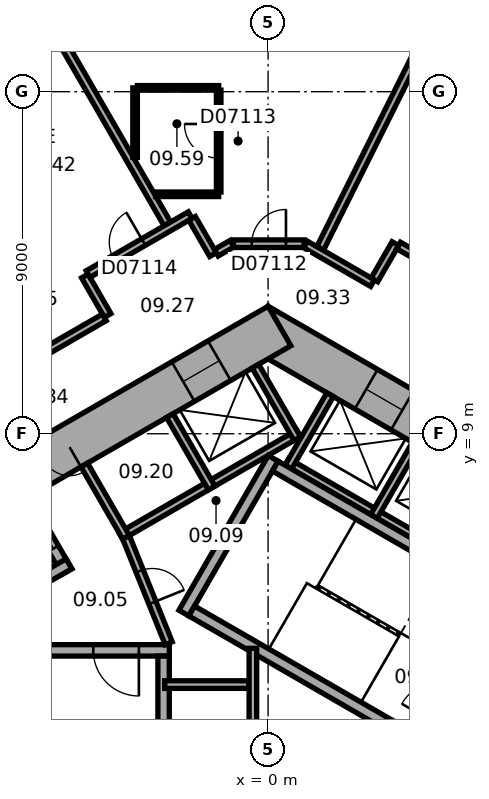
"""IFC4 building model, lengths in metres.
Left out: names, types, materials, properties, quantities, classifications, styles, units other than length and angle.
Written with IfcOpenShell. Run it as: python <this file> out.ifc"""

import sys

from ifc_helpers import new_model, si_unit, direction, frame, frame_2d, origin, place, context, subcontext, project, spatial, rectangle, extrude, element, fill, save


model = new_model("IFC4")
c1 = context("Model", 3, precision=1e-05, world=origin(), true_north=direction((0.0, 1.0)))
c2 = subcontext(c1, "Body", "Model", "MODEL_VIEW")
j1 = project(units=[si_unit("LENGTHUNIT", "METRE"), si_unit("PLANEANGLEUNIT", "RADIAN")], contexts=[c1])
p1 = place(None, origin())
s1 = spatial("IfcSite", under=j1, at=p1, CompositionType="ELEMENT")
p2 = place(p1, origin())
s2 = spatial("IfcBuilding", under=s1, at=p2, CompositionType="ELEMENT")
p3 = place(p2, frame((0.0, 0.0, 50.6)))
s3 = spatial("IfcBuildingStorey", under=s2, at=p3, CompositionType="ELEMENT", Elevation=50.6)
p4 = place(p3, frame((10.4, 5.658, 0.0), z_axis=(0.0, 0.0, 1.0), x_axis=(-0.866021384402, 0.500006961711, 0.0)))
e1 = element("IfcWall", 1, at=p4, inside=s3, PredefinedType="SHEAR", context=c2, shape_type="SweptSolid", body=[
    extrude(rectangle(XDim=12.355, YDim=1.2, at=frame_2d((6.178, 0.0))), origin(), (0.0, 0.0, 1.0), 3.3),
])
p5 = place(p4, frame((2.728, 0.0, 0.0)))
e2 = element("IfcOpeningElement", 2, at=p5, cuts=e1, PredefinedType="OPENING", context=c2, shape_type="SweptSolid", body=[
    extrude(rectangle(XDim=1.1, YDim=2.1, at=frame_2d((0.55, 1.05))), frame((0.0, 0.61, 0.0), z_axis=(0.0, -1.0, 0.0), x_axis=(1.0, 0.0, 0.0)), (0.0, 0.0, 1.0), 1.22),
])
p6 = place(p4, frame((5.328, 0.0, 0.0)))
e3 = element("IfcOpeningElement", 3, at=p6, cuts=e1, PredefinedType="OPENING", context=c2, shape_type="SweptSolid", body=[
    extrude(rectangle(XDim=1.1, YDim=2.1, at=frame_2d((0.55, 1.05))), frame((0.0, 0.61, 0.0), z_axis=(0.0, -1.0, 0.0), x_axis=(1.0, 0.0, 0.0)), (0.0, 0.0, 1.0), 1.22),
])
p7 = place(p4, frame((7.928, 0.0, 0.0)))
e4 = element("IfcOpeningElement", 4, at=p7, cuts=e1, PredefinedType="OPENING", context=c2, shape_type="SweptSolid", body=[
    extrude(rectangle(XDim=1.1, YDim=2.1, at=frame_2d((0.55, 1.05))), frame((0.0, 0.61, 0.0), z_axis=(0.0, -1.0, 0.0), x_axis=(1.0, 0.0, 0.0)), (0.0, 0.0, 1.0), 1.22),
])
p8 = place(p3, frame((0.3, 11.836, 0.0), z_axis=(0.0, 0.0, 1.0), x_axis=(-0.866021384402, -0.500006961711, 0.0)))
e5 = element("IfcWall", 5, at=p8, inside=s3, PredefinedType="SHEAR", context=c2, shape_type="SweptSolid", body=[
    extrude(rectangle(XDim=12.355, YDim=1.2, at=frame_2d((6.178, 0.0))), origin(), (0.0, 0.0, 1.0), 3.3),
])
p9 = place(p8, frame((6.378, 0.0, 0.0)))
e6 = element("IfcOpeningElement", 6, at=p9, cuts=e5, PredefinedType="OPENING", context=c2, shape_type="SweptSolid", body=[
    extrude(rectangle(XDim=1.5, YDim=2.1, at=frame_2d((0.75, 1.05))), frame((0.0, 0.61, 0.0), z_axis=(0.0, -1.0, 0.0), x_axis=(1.0, 0.0, 0.0)), (0.0, 0.0, 1.0), 1.22),
])
p10 = place(p8, frame((1.828, 0.0, 0.0)))
e7 = element("IfcOpeningElement", 7, at=p10, cuts=e5, PredefinedType="OPENING", context=c2, shape_type="SweptSolid", body=[
    extrude(rectangle(XDim=1.1, YDim=2.1, at=frame_2d((0.55, 1.05))), frame((0.0, 0.61, 0.0), z_axis=(0.0, -1.0, 0.0), x_axis=(1.0, 0.0, 0.0)), (0.0, 0.0, 1.0), 1.22),
])
p11 = place(p3, frame((20.63, 15.47, 0.0), z_axis=(0.0, 0.0, 1.0), x_axis=(-0.894934518609, 0.446197498203, 0.0)))
e8 = element("IfcWall", 8, at=p11, inside=s3, PredefinedType="STANDARD", context=c2, shape_type="SweptSolid", body=[
    extrude(rectangle(XDim=21.246, YDim=0.2, at=frame_2d((10.623, 0.0))), origin(), (0.0, 0.0, 1.0), 3.3),
])
p12 = place(p11, frame((1.553, 0.0, 0.8)))
e9 = element("IfcOpeningElement", 9, at=p12, cuts=e8, PredefinedType="OPENING", context=c2, shape_type="SweptSolid", body=[
    extrude(rectangle(XDim=2.4, YDim=1.7, at=frame_2d((1.2, 0.85))), frame((0.0, 0.11, 0.0), z_axis=(0.0, -1.0, 0.0), x_axis=(1.0, 0.0, 0.0)), (0.0, 0.0, 1.0), 0.22),
])
p13 = place(p11, frame((5.488, 0.0, 0.8)))
e10 = element("IfcOpeningElement", 10, at=p13, cuts=e8, PredefinedType="OPENING", context=c2, shape_type="SweptSolid", body=[
    extrude(rectangle(XDim=2.4, YDim=1.7, at=frame_2d((1.2, 0.85))), frame((0.0, 0.11, 0.0), z_axis=(0.0, -1.0, 0.0), x_axis=(1.0, 0.0, 0.0)), (0.0, 0.0, 1.0), 0.22),
])
p14 = place(p11, frame((9.422, 0.0, 0.8)))
e11 = element("IfcOpeningElement", 11, at=p14, cuts=e8, PredefinedType="OPENING", context=c2, shape_type="SweptSolid", body=[
    extrude(rectangle(XDim=2.4, YDim=1.7, at=frame_2d((1.2, 0.85))), frame((0.0, 0.11, 0.0), z_axis=(0.0, -1.0, 0.0), x_axis=(1.0, 0.0, 0.0)), (0.0, 0.0, 1.0), 0.22),
])
p15 = place(p11, frame((13.357, 0.0, 0.8)))
e12 = element("IfcOpeningElement", 12, at=p15, cuts=e8, PredefinedType="OPENING", context=c2, shape_type="SweptSolid", body=[
    extrude(rectangle(XDim=2.4, YDim=1.7, at=frame_2d((1.2, 0.85))), frame((0.0, 0.11, 0.0), z_axis=(0.0, -1.0, 0.0), x_axis=(1.0, 0.0, 0.0)), (0.0, 0.0, 1.0), 0.22),
])
p16 = place(p11, frame((17.292, 0.0, 0.8)))
e13 = element("IfcOpeningElement", 13, at=p16, cuts=e8, PredefinedType="OPENING", context=c2, shape_type="SweptSolid", body=[
    extrude(rectangle(XDim=2.4, YDim=1.7, at=frame_2d((1.2, 0.85))), frame((0.0, 0.11, 0.0), z_axis=(0.0, -1.0, 0.0), x_axis=(1.0, 0.0, 0.0)), (0.0, 0.0, 1.0), 0.22),
])
p17 = place(p3, frame((-3.136, 24.805, 0.0), z_axis=(0.0, 0.0, 1.0), x_axis=(-0.866028291626, -0.499994998079, 0.0)))
e14 = element("IfcWall", 14, at=p17, inside=s3, PredefinedType="STANDARD", context=c2, shape_type="SweptSolid", body=[
    extrude(rectangle(XDim=21.246, YDim=0.2, at=frame_2d((10.623, 0.0))), origin(), (0.0, 0.0, 1.0), 3.3),
])
p18 = place(p17, frame((1.555, 0.0, 0.8)))
e15 = element("IfcOpeningElement", 15, at=p18, cuts=e14, PredefinedType="OPENING", context=c2, shape_type="SweptSolid", body=[
    extrude(rectangle(XDim=2.4, YDim=1.7, at=frame_2d((1.2, 0.85))), frame((0.0, 0.11, 0.0), z_axis=(0.0, -1.0, 0.0), x_axis=(1.0, 0.0, 0.0)), (0.0, 0.0, 1.0), 0.22),
])
p19 = place(p17, frame((5.489, 0.0, 0.8)))
e16 = element("IfcOpeningElement", 16, at=p19, cuts=e14, PredefinedType="OPENING", context=c2, shape_type="SweptSolid", body=[
    extrude(rectangle(XDim=2.4, YDim=1.7, at=frame_2d((1.2, 0.85))), frame((0.0, 0.11, 0.0), z_axis=(0.0, -1.0, 0.0), x_axis=(1.0, 0.0, 0.0)), (0.0, 0.0, 1.0), 0.22),
])
p20 = place(p17, frame((9.424, 0.0, 0.8)))
e17 = element("IfcOpeningElement", 17, at=p20, cuts=e14, PredefinedType="OPENING", context=c2, shape_type="SweptSolid", body=[
    extrude(rectangle(XDim=2.4, YDim=1.7, at=frame_2d((1.2, 0.85))), frame((0.0, 0.11, 0.0), z_axis=(0.0, -1.0, 0.0), x_axis=(1.0, 0.0, 0.0)), (0.0, 0.0, 1.0), 0.22),
])
p21 = place(p17, frame((13.358, 0.0, 0.8)))
e18 = element("IfcOpeningElement", 18, at=p21, cuts=e14, PredefinedType="OPENING", context=c2, shape_type="SweptSolid", body=[
    extrude(rectangle(XDim=2.4, YDim=1.7, at=frame_2d((1.2, 0.85))), frame((0.0, 0.11, 0.0), z_axis=(0.0, -1.0, 0.0), x_axis=(1.0, 0.0, 0.0)), (0.0, 0.0, 1.0), 0.22),
])
p22 = place(p17, frame((17.293, 0.0, 0.8)))
e19 = element("IfcOpeningElement", 19, at=p22, cuts=e14, PredefinedType="OPENING", context=c2, shape_type="SweptSolid", body=[
    extrude(rectangle(XDim=2.4, YDim=1.7, at=frame_2d((1.2, 0.85))), frame((0.0, 0.11, 0.0), z_axis=(0.0, -1.0, 0.0), x_axis=(1.0, 0.0, 0.0)), (0.0, 0.0, 1.0), 0.22),
])
p23 = place(p3, frame((7.424, 4.259, 0.0), z_axis=(0.0, 0.0, 1.0), x_axis=(-0.866026010844, 0.49999894854, 0.0)))
e20 = element("IfcWall", 20, at=p23, inside=s3, PredefinedType="PARTITIONING", context=c2, shape_type="SweptSolid", body=[
    extrude(rectangle(XDim=8.0, YDim=0.2, at=frame_2d((4.0, 0.0))), origin(), (0.0, 0.0, 1.0), 3.05),
])
for number, where, z_axis, x_axis in (
    (21, (2.784, 6.822, 0.0), (0.0, 0.0, 1.0), (0.5, 0.866, 0.0)),
    (22, (0.532, 8.122, 0.0), (0.0, 0.0, 1.0), (0.5, 0.866, 0.0)),
):
    element("IfcWall", number, at=place(p3, frame(where, z_axis=z_axis, x_axis=x_axis)), inside=s3, PredefinedType="PARTITIONING", context=c2, shape_type="SweptSolid", body=[
        extrude(rectangle(XDim=2.2, YDim=0.2, at=frame_2d((1.1, 0.0))), origin(), (0.0, 0.0, 1.0), 3.05),
    ])
p24 = place(p3, frame((0.803, 9.009, 0.0), z_axis=(0.0, 0.0, 1.0), x_axis=(-0.866028230842, -0.499995103361, 0.0)))
e23 = element("IfcWall", 23, at=p24, inside=s3, PredefinedType="PARTITIONING", context=c2, shape_type="SweptSolid", body=[
    extrude(rectangle(XDim=5.4, YDim=0.2, at=frame_2d((2.7, 0.0))), origin(), (0.0, 0.0, 1.0), 3.05),
])
p25 = place(p3, frame((0.767, 8.872, 0.0), z_axis=(0.0, 0.0, 1.0), x_axis=(-0.499994660107, 0.866028486751, 0.0)))
e24 = element("IfcWall", 24, at=p25, inside=s3, PredefinedType="PARTITIONING", context=c2, shape_type="SweptSolid", body=[
    extrude(rectangle(XDim=2.2, YDim=0.2, at=frame_2d((1.1, 0.0))), origin(), (0.0, 0.0, 1.0), 3.05),
])
for number, where, z_axis, x_axis in (
    (25, (-1.485, 7.572, 0.0), (0.0, 0.0, 1.0), (-0.5, 0.866, 0.0)),
    (26, (-3.737, 6.272, 0.0), (0.0, 0.0, 1.0), (-0.5, 0.866, 0.0)),
):
    element("IfcWall", number, at=place(p3, frame(where, z_axis=z_axis, x_axis=x_axis)), inside=s3, PredefinedType="PARTITIONING", context=c2, shape_type="SweptSolid", body=[
        extrude(rectangle(XDim=2.2, YDim=0.2, at=frame_2d((1.1, 0.0))), origin(), (0.0, 0.0, 1.0), 3.05),
    ])
p26 = place(p3, frame((-2.216, 4.282, 0.0), z_axis=(0.0, 0.0, 1.0), x_axis=(0.499977259774, 0.866038532462, 0.0)))
e27 = element("IfcWall", 27, at=p26, inside=s3, PredefinedType="SHEAR", context=c2, shape_type="SweptSolid", body=[
    extrude(rectangle(XDim=4.7, YDim=0.3, at=frame_2d((2.35, 0.0))), origin(), (0.0, 0.0, 1.0), 3.05),
])
for number, where, z_axis, x_axis in (
    (28, (4.103, 0.807, 0.0), (0.0, 0.0, 1.0), (-0.866, 0.5, 0.0)),
    (29, (6.303, 4.617, 0.0), (0.0, 0.0, 1.0), (-0.866, 0.5, 0.0)),
):
    element("IfcWall", number, at=place(p3, frame(where, z_axis=z_axis, x_axis=x_axis)), inside=s3, PredefinedType="SHEAR", context=c2, shape_type="SweptSolid", body=[
        extrude(rectangle(XDim=7.06, YDim=0.3, at=frame_2d((3.53, 0.0))), origin(), (0.0, 0.0, 1.0), 3.05),
    ])
p27 = place(p3, frame((-2.6, 3.3, 0.0), z_axis=(0.0, 0.0, 1.0), x_axis=(-1.0, 0.0, 0.0)))
e30 = element("IfcWall", 30, at=p27, inside=s3, PredefinedType="SHEAR", context=c2, shape_type="SweptSolid", body=[
    extrude(rectangle(XDim=4.7, YDim=0.3, at=frame_2d((2.35, 0.0))), origin(), (0.0, 0.0, 1.0), 3.05),
])
p28 = place(p27, frame((0.8, 0.0, 0.0)))
e31 = element("IfcOpeningElement", 31, at=p28, cuts=e30, PredefinedType="OPENING", context=c2, shape_type="SweptSolid", body=[
    extrude(rectangle(XDim=1.2, YDim=2.1, at=frame_2d((0.6, 1.05))), frame((0.0, 0.16, 0.0), z_axis=(0.0, -1.0, 0.0), x_axis=(1.0, 0.0, 0.0)), (0.0, 0.0, 1.0), 0.32),
])
p29 = place(p3, frame((-2.75, 3.15, 0.0), z_axis=(0.0, 0.0, 1.0), x_axis=(0.0, -1.0, 0.0)))
e32 = element("IfcWall", 32, at=p29, inside=s3, PredefinedType="SHEAR", context=c2, shape_type="SweptSolid", body=[
    extrude(rectangle(XDim=7.06, YDim=0.3, at=frame_2d((3.53, 0.0))), origin(), (0.0, 0.0, 1.0), 3.05),
])
p30 = place(p3, frame((-5.295, 5.372, 0.0), z_axis=(0.0, 0.0, 1.0), x_axis=(-0.500077893725, 0.86598042715, 0.0)))
e33 = element("IfcWall", 33, at=p30, inside=s3, PredefinedType="SHEAR", context=c2, shape_type="SweptSolid", body=[
    extrude(rectangle(XDim=2.2, YDim=0.3, at=frame_2d((1.1, 0.0))), origin(), (0.0, 0.0, 1.0), 3.05),
])
p31 = place(p30, frame((0.7, 0.0, 0.0)))
e34 = element("IfcOpeningElement", 34, at=p31, cuts=e33, PredefinedType="OPENING", context=c2, shape_type="SweptSolid", body=[
    extrude(rectangle(XDim=1.1, YDim=2.1, at=frame_2d((0.55, 1.05))), frame((0.0, 0.16, 0.0), z_axis=(0.0, -1.0, 0.0), x_axis=(1.0, 0.0, 0.0)), (0.0, 0.0, 1.0), 0.32),
])
p32 = place(p3, frame((-5.24, 5.577, 0.0), z_axis=(0.0, 0.0, 1.0), x_axis=(-0.866014461049, -0.500018952895, 0.0)))
e35 = element("IfcWall", 35, at=p32, inside=s3, PredefinedType="SHEAR", context=c2, shape_type="SweptSolid", body=[
    extrude(rectangle(XDim=3.35, YDim=0.3, at=frame_2d((1.675, 0.0))), origin(), (0.0, 0.0, 1.0), 3.05),
])
p33 = place(p3, frame((-2.615, 3.487, 0.0), z_axis=(0.0, 0.0, 1.0), x_axis=(-0.373576831041, 0.92759924068, 0.0)))
e36 = element("IfcWall", 36, at=p33, inside=s3, PredefinedType="PARTITIONING", context=c2, shape_type="SweptSolid", body=[
    extrude(rectangle(XDim=3.002, YDim=0.2, at=frame_2d((1.501, 0.0))), origin(), (0.0, 0.0, 1.0), 3.05),
])
p34 = place(p33, frame((1.15, 0.0, 0.0)))
e37 = element("IfcOpeningElement", 37, at=p34, cuts=e36, PredefinedType="OPENING", context=c2, shape_type="SweptSolid", body=[
    extrude(rectangle(XDim=0.9, YDim=2.1, at=frame_2d((0.45, 1.05))), frame((0.0, 0.11, 0.0), z_axis=(0.0, -1.0, 0.0), x_axis=(1.0, 0.0, 0.0)), (0.0, 0.0, 1.0), 0.22),
])
p35 = place(p3, frame((-2.72, 2.4, 0.0), z_axis=(0.0, 0.0, 1.0), x_axis=(1.0, 0.0, 0.0)))
e38 = element("IfcWall", 38, at=p35, inside=s3, PredefinedType="PARTITIONING", context=c2, shape_type="SweptSolid", body=[
    extrude(rectangle(XDim=2.22, YDim=0.2, at=frame_2d((1.11, 0.0))), origin(), (0.0, 0.0, 1.0), 3.05),
])
p36 = place(p3, frame((-0.4, -3.353, 0.0), z_axis=(0.0, 0.0, 1.0), x_axis=(0.0, 1.0, 0.0)))
e39 = element("IfcWall", 39, at=p36, inside=s3, PredefinedType="PARTITIONING", context=c2, shape_type="SweptSolid", body=[
    extrude(rectangle(XDim=6.707, YDim=0.2, at=frame_2d((3.353, 0.0))), origin(), (0.0, 0.0, 1.0), 3.05),
])
p37 = place(p3, frame((-6.676, 21.492, 0.0), z_axis=(0.0, 0.0, 1.0), x_axis=(0.500011263043, -0.866018900966, 0.0)))
e40 = element("IfcWall", 40, at=p37, inside=s3, PredefinedType="PARTITIONING", context=c2, shape_type="SweptSolid", body=[
    extrude(rectangle(XDim=8.049, YDim=0.2, at=frame_2d((4.024, 0.0))), origin(), (0.0, 0.0, 1.0), 3.05),
])
p38 = place(p3, frame((-4.823, 13.152, 0.0), z_axis=(0.0, 0.0, 1.0), x_axis=(0.499986357472, -0.866033280158, 0.0)))
e41 = element("IfcWall", 41, at=p38, inside=s3, PredefinedType="PARTITIONING", context=c2, shape_type="SweptSolid", body=[
    extrude(rectangle(XDim=1.201, YDim=0.2, at=frame_2d((0.601, 0.0))), origin(), (0.0, 0.0, 1.0), 3.05),
])
p39 = place(p3, frame((-4.309, 12.061, 0.0), z_axis=(0.0, 0.0, 1.0), x_axis=(-0.866020679205, -0.500008183122, 0.0)))
e42 = element("IfcWall", 42, at=p39, inside=s3, PredefinedType="PARTITIONING", context=c2, shape_type="SweptSolid", body=[
    extrude(rectangle(XDim=5.104, YDim=0.2, at=frame_2d((2.552, 0.0))), origin(), (0.0, 0.0, 1.0), 3.05),
])
p40 = place(p3, frame((-3.5, 16.271, 0.0), z_axis=(0.0, 0.0, 1.0), x_axis=(0.0, 1.0, 0.0)))
e43 = element("IfcWall", 43, at=p40, inside=s3, PredefinedType="PARTITIONING", context=c2, shape_type="SweptSolid", body=[
    extrude(rectangle(XDim=1.829, YDim=0.12, at=frame_2d((0.915, 0.0))), origin(), (0.0, 0.0, 1.0), 3.05),
])
p41 = place(p3, frame((-3.44, 18.101, 0.0), z_axis=(0.0, 0.0, 1.0), x_axis=(1.0, 0.0, 0.0)))
e44 = element("IfcWall", 44, at=p41, inside=s3, PredefinedType="PARTITIONING", context=c2, shape_type="SweptSolid", body=[
    extrude(rectangle(XDim=2.14, YDim=0.12, at=frame_2d((1.07, 0.0))), origin(), (0.0, 0.0, 1.0), 3.05),
])
p42 = place(p3, frame((-2.05, 14.752, 0.0), z_axis=(0.0, 0.0, 1.0), x_axis=(-0.866030936828, -0.499990416364, 0.0)))
e45 = element("IfcWall", 45, at=p42, inside=s3, PredefinedType="PARTITIONING", context=c2, shape_type="SweptSolid", body=[
    extrude(rectangle(XDim=3.102, YDim=0.2, at=frame_2d((1.551, 0.0))), origin(), (0.0, 0.0, 1.0), 3.05),
])
p43 = place(p42, frame((1.419, 0.0, 0.0)))
e46 = element("IfcOpeningElement", 46, at=p43, cuts=e45, PredefinedType="OPENING", context=c2, shape_type="SweptSolid", body=[
    extrude(rectangle(XDim=0.9, YDim=2.1, at=frame_2d((0.45, 1.05))), frame((0.0, 0.11, 0.0), z_axis=(0.0, -1.0, 0.0), x_axis=(1.0, 0.0, 0.0)), (0.0, 0.0, 1.0), 0.22),
])
p44 = place(p3, frame((-1.449, 13.712, 0.0), z_axis=(0.0, 0.0, 1.0), x_axis=(-0.499978356969, 0.866037899034, 0.0)))
e47 = element("IfcWall", 47, at=p44, inside=s3, PredefinedType="PARTITIONING", context=c2, shape_type="SweptSolid", body=[
    extrude(rectangle(XDim=1.101, YDim=0.2, at=frame_2d((0.551, 0.0))), origin(), (0.0, 0.0, 1.0), 3.05),
])
p45 = place(p3, frame((-1.3, 15.301, 0.0), z_axis=(0.0, 0.0, 1.0), x_axis=(-1.0, 0.0, 0.0)))
e48 = element("IfcWall", 48, at=p45, inside=s3, PredefinedType="PARTITIONING", context=c2, shape_type="SweptSolid", body=[
    extrude(rectangle(XDim=1.661, YDim=0.12, at=frame_2d((0.831, 0.0))), origin(), (0.0, 0.0, 1.0), 3.05),
])
p46 = place(p3, frame((-1.3, 18.041, 0.0), z_axis=(0.0, 0.0, 1.0), x_axis=(0.0, -1.0, 0.0)))
e49 = element("IfcWall", 49, at=p46, inside=s3, PredefinedType="PARTITIONING", context=c2, shape_type="SweptSolid", body=[
    extrude(rectangle(XDim=2.68, YDim=0.12, at=frame_2d((1.34, 0.0))), origin(), (0.0, 0.0, 1.0), 3.05),
])
p47 = place(p46, frame((0.89, 0.0, 0.0)))
e50 = element("IfcOpeningElement", 50, at=p47, cuts=e49, PredefinedType="OPENING", context=c2, shape_type="SweptSolid", body=[
    extrude(rectangle(XDim=0.9, YDim=2.1, at=frame_2d((0.45, 1.05))), frame((0.0, 0.07, 0.0), z_axis=(0.0, -1.0, 0.0), x_axis=(1.0, 0.0, 0.0)), (0.0, 0.0, 1.0), 0.14),
])
p48 = place(p3, frame((-0.95, 14.001, 0.0), z_axis=(0.0, 0.0, 1.0), x_axis=(-0.86609177584, -0.499885022602, 0.0)))
e51 = element("IfcWall", 51, at=p48, inside=s3, PredefinedType="PARTITIONING", context=c2, shape_type="SweptSolid", body=[
    extrude(rectangle(XDim=0.477, YDim=0.2, at=frame_2d((0.238, 0.0))), origin(), (0.0, 0.0, 1.0), 3.05),
])
p49 = place(p3, frame((0.95, 14.001, 0.0), z_axis=(0.0, 0.0, 1.0), x_axis=(-1.0, 0.0, 0.0)))
e52 = element("IfcWall", 52, at=p49, inside=s3, PredefinedType="PARTITIONING", context=c2, shape_type="SweptSolid", body=[
    extrude(rectangle(XDim=1.86, YDim=0.2, at=frame_2d((0.93, 0.0))), origin(), (0.0, 0.0, 1.0), 3.05),
])
p50 = place(p49, frame((0.48, 0.0, 0.0)))
e53 = element("IfcOpeningElement", 53, at=p50, cuts=e52, PredefinedType="OPENING", context=c2, shape_type="SweptSolid", body=[
    extrude(rectangle(XDim=0.9, YDim=2.1, at=frame_2d((0.45, 1.05))), frame((0.0, 0.11, 0.0), z_axis=(0.0, -1.0, 0.0), x_axis=(1.0, 0.0, 0.0)), (0.0, 0.0, 1.0), 0.22),
])
p51 = place(p3, frame((2.748, 12.962, 0.0), z_axis=(0.0, 0.0, 1.0), x_axis=(-0.866013897511, 0.50001992892, 0.0)))
e54 = element("IfcWall", 54, at=p51, inside=s3, PredefinedType="PARTITIONING", context=c2, shape_type="SweptSolid", body=[
    extrude(rectangle(XDim=2.037, YDim=0.2, at=frame_2d((1.018, 0.0))), origin(), (0.0, 0.0, 1.0), 3.05),
])
p52 = place(p3, frame((3.349, 14.002, 0.0), z_axis=(0.0, 0.0, 1.0), x_axis=(-0.500074377092, -0.865982457891, 0.0)))
e55 = element("IfcWall", 55, at=p52, inside=s3, PredefinedType="PARTITIONING", context=c2, shape_type="SweptSolid", body=[
    extrude(rectangle(XDim=1.101, YDim=0.2, at=frame_2d((0.55, 0.0))), origin(), (0.0, 0.0, 1.0), 3.05),
])
p53 = place(p3, frame((5.351, 21.859, 0.0), z_axis=(0.0, 0.0, 1.0), x_axis=(-0.446205309328, -0.894930624086, 0.0)))
e56 = element("IfcWall", 56, at=p53, inside=s3, PredefinedType="PARTITIONING", context=c2, shape_type="SweptSolid", body=[
    extrude(rectangle(XDim=8.913, YDim=0.2, at=frame_2d((4.457, 0.0))), origin(), (0.0, 0.0, 1.0), 2.6),
])
p54 = place(p3, frame((10.885, 9.652, 0.0), z_axis=(0.0, 0.0, 1.0), x_axis=(-0.866033868542, 0.499985338323, 0.0)))
e57 = element("IfcWall", 57, at=p54, inside=s3, PredefinedType="PARTITIONING", context=c2, shape_type="SweptSolid", body=[
    extrude(rectangle(XDim=8.602, YDim=0.2, at=frame_2d((4.301, 0.0))), origin(), (0.0, 0.0, 1.0), 3.05),
])
p55 = place(p54, frame((5.069, 0.0, 0.0)))
e58 = element("IfcOpeningElement", 58, at=p55, cuts=e57, PredefinedType="OPENING", context=c2, shape_type="SweptSolid", body=[
    extrude(rectangle(XDim=1.0, YDim=2.1, at=frame_2d((0.5, 1.05))), frame((0.0, 0.11, 0.0), z_axis=(0.0, -1.0, 0.0), x_axis=(1.0, 0.0, 0.0)), (0.0, 0.0, 1.0), 0.22),
])
p56 = place(p9, origin())
e59 = element("IfcDoor", 59, at=p56, inside=s3, OperationType="DOUBLE_DOOR_SINGLE_SWING", PredefinedType="DOOR", context=c2, shape_type="SweptSolid", body=[
    extrude(rectangle(XDim=1.5, YDim=2.1, at=frame_2d((0.75, 1.05))), frame((0.0, 0.025, 0.0), z_axis=(0.0, -1.0, 0.0), x_axis=(1.0, 0.0, 0.0)), (0.0, 0.0, 1.0), 0.05),
])
fill(e6, e59)
p57 = place(p28, origin())
e60 = element("IfcDoor", 60, at=p57, inside=s3, OperationType="SINGLE_SWING_RIGHT", PredefinedType="DOOR", context=c2, shape_type="SweptSolid", body=[
    extrude(rectangle(XDim=1.2, YDim=2.1, at=frame_2d((0.6, 1.05))), frame((0.0, 0.025, 0.0), z_axis=(0.0, -1.0, 0.0), x_axis=(1.0, 0.0, 0.0)), (0.0, 0.0, 1.0), 0.05),
])
fill(e31, e60)
p58 = place(p34, origin())
e61 = element("IfcDoor", 61, at=p58, inside=s3, OperationType="SINGLE_SWING_LEFT", PredefinedType="DOOR", context=c2, shape_type="SweptSolid", body=[
    extrude(rectangle(XDim=0.9, YDim=2.1, at=frame_2d((0.45, 1.05))), frame((0.0, 0.025, 0.0), z_axis=(0.0, -1.0, 0.0), x_axis=(1.0, 0.0, 0.0)), (0.0, 0.0, 1.0), 0.05),
])
fill(e37, e61)
p59 = place(p31, origin())
e62 = element("IfcDoor", 62, at=p59, inside=s3, OperationType="DOUBLE_DOOR_SLIDING", PredefinedType="DOOR", context=c2, shape_type="SweptSolid", body=[
    extrude(rectangle(XDim=1.1, YDim=2.1, at=frame_2d((0.55, 1.05))), frame((0.0, 0.025, 0.0), z_axis=(0.0, -1.0, 0.0), x_axis=(1.0, 0.0, 0.0)), (0.0, 0.0, 1.0), 0.05),
])
fill(e34, e62)
p60 = place(p7, origin())
e63 = element("IfcDoor", 63, at=p60, inside=s3, OperationType="DOUBLE_DOOR_SLIDING", PredefinedType="DOOR", context=c2, shape_type="SweptSolid", body=[
    extrude(rectangle(XDim=1.1, YDim=2.1, at=frame_2d((0.55, 1.05))), frame((0.0, 0.025, 0.0), z_axis=(0.0, -1.0, 0.0), x_axis=(1.0, 0.0, 0.0)), (0.0, 0.0, 1.0), 0.05),
])
fill(e4, e63)
p61 = place(p10, origin())
e64 = element("IfcDoor", 64, at=p61, inside=s3, OperationType="DOUBLE_DOOR_SLIDING", PredefinedType="DOOR", context=c2, shape_type="SweptSolid", body=[
    extrude(rectangle(XDim=1.1, YDim=2.1, at=frame_2d((0.55, 1.05))), frame((0.0, 0.025, 0.0), z_axis=(0.0, -1.0, 0.0), x_axis=(1.0, 0.0, 0.0)), (0.0, 0.0, 1.0), 0.05),
])
fill(e7, e64)
p62 = place(p50, origin())
e65 = element("IfcDoor", 65, at=p62, inside=s3, OperationType="SINGLE_SWING_LEFT", PredefinedType="DOOR", context=c2, shape_type="SweptSolid", body=[
    extrude(rectangle(XDim=0.9, YDim=2.1, at=frame_2d((0.45, 1.05))), frame((0.0, 0.025, 0.0), z_axis=(0.0, -1.0, 0.0), x_axis=(1.0, 0.0, 0.0)), (0.0, 0.0, 1.0), 0.05),
])
fill(e53, e65)
p63 = place(p47, origin())
e66 = element("IfcDoor", 66, at=p63, inside=s3, OperationType="SINGLE_SWING_LEFT", PredefinedType="DOOR", context=c2, shape_type="SweptSolid", body=[
    extrude(rectangle(XDim=0.9, YDim=2.1, at=frame_2d((0.45, 1.05))), frame((0.0, 0.025, 0.0), z_axis=(0.0, -1.0, 0.0), x_axis=(1.0, 0.0, 0.0)), (0.0, 0.0, 1.0), 0.05),
])
fill(e50, e66)
p64 = place(p43, origin())
e67 = element("IfcDoor", 67, at=p64, inside=s3, OperationType="SINGLE_SWING_LEFT", PredefinedType="DOOR", context=c2, shape_type="SweptSolid", body=[
    extrude(rectangle(XDim=0.9, YDim=2.1, at=frame_2d((0.45, 1.05))), frame((0.0, 0.025, 0.0), z_axis=(0.0, -1.0, 0.0), x_axis=(1.0, 0.0, 0.0)), (0.0, 0.0, 1.0), 0.05),
])
fill(e46, e67)
save(model, sys.argv[1])
